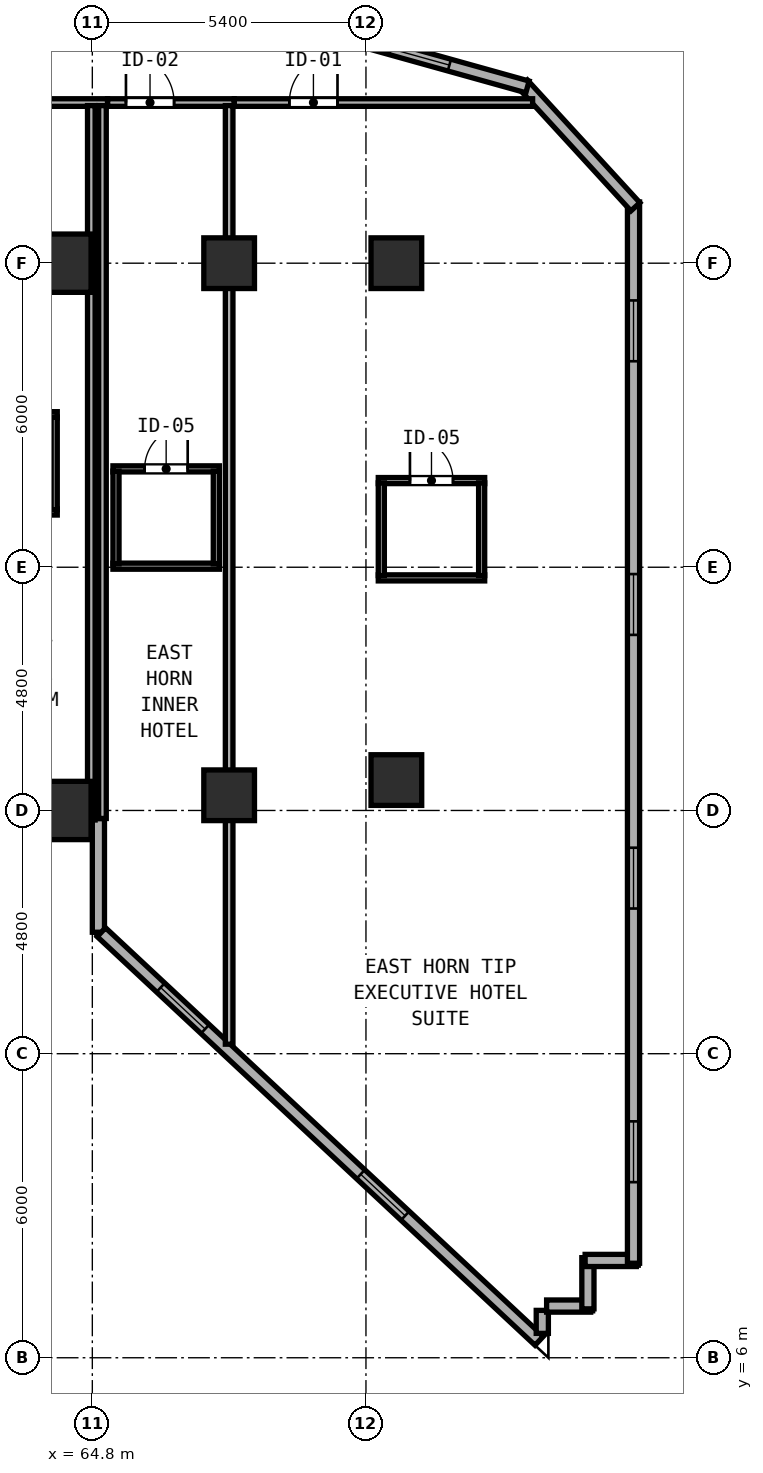
"""IFC4 building model, lengths in metres.
Left out: names, types, materials, properties, quantities, classifications, styles, units other than length and angle.
Written with IfcOpenShell. Run it as: python <this file> out.ifc"""

import sys

from ifc_helpers import new_model, si_unit, direction, frame, frame_2d, origin, origin_2d, place, context, subcontext, project, spatial, rectangle, hollow_rectangle, extrude, element, fill, save


model = new_model("IFC4")
c1 = context("Model", 3, precision=1e-05, world=origin(), true_north=direction((0.0, 1.0)))
c2 = subcontext(c1, "Body", "Model", "MODEL_VIEW")
j1 = project(units=[si_unit("LENGTHUNIT", "METRE"), si_unit("PLANEANGLEUNIT", "RADIAN")], contexts=[c1])
p1 = place(None, origin())
s1 = spatial("IfcSite", under=j1, at=p1, CompositionType="ELEMENT")
p2 = place(p1, origin())
s2 = spatial("IfcBuilding", under=s1, at=p2, CompositionType="ELEMENT")
p3 = place(p2, frame((0.0, 0.0, 78.0)))
s3 = spatial("IfcBuildingStorey", under=s2, at=p3, CompositionType="ELEMENT", Elevation=78.0)
for number, where, z_axis, x_axis in (
    (1, (64.2, 16.8, 0.0), (0.0, 0.0, 1.0), (1.0, 0.0, 0.0)),
    (2, (64.2, 27.6, 0.0), (0.0, 0.0, 1.0), (1.0, 0.0, 0.0)),
):
    element("IfcColumn", number, at=place(p3, frame(where, z_axis=z_axis, x_axis=x_axis)), inside=s3, PredefinedType="COLUMN", context=c2, shape_type="SweptSolid", body=[
        extrude(hollow_rectangle(XDim=1.15, YDim=1.15, WallThickness=0.042, at=origin_2d()), origin(), (0.0, 0.0, 1.0), 3.8),
    ])
for number, where, z_axis, x_axis in (
    (3, (70.8, 17.4, 0.0), (0.0, 0.0, 1.0), (1.0, 0.0, 0.0)),
    (4, (70.8, 27.6, 0.0), (0.0, 0.0, 1.0), (1.0, 0.0, 0.0)),
    (5, (67.5, 17.1, 0.0), (0.0, 0.0, 1.0), (1.0, 0.0, 0.0)),
    (6, (67.5, 27.6, 0.0), (0.0, 0.0, 1.0), (1.0, 0.0, 0.0)),
):
    element("IfcColumn", number, at=place(p3, frame(where, z_axis=z_axis, x_axis=x_axis)), inside=s3, PredefinedType="COLUMN", context=c2, shape_type="SweptSolid", body=[
        extrude(hollow_rectangle(XDim=1.0, YDim=1.0, WallThickness=0.038, at=origin_2d()), origin(), (0.0, 0.0, 1.0), 3.8),
    ])
p4 = place(p3, frame((64.92, 16.64, 0.0), z_axis=(0.0, 0.0, 1.0), x_axis=(0.0, -1.0, 0.0)))
e7 = element("IfcWall", 7, at=p4, inside=s3, PredefinedType="SOLIDWALL", context=c2, shape_type="SweptSolid", body=[
    extrude(rectangle(XDim=2.243, YDim=0.24, at=frame_2d((1.121, 0.0))), origin(), (0.0, 0.0, 1.0), 3.6),
])
p5 = place(p3, frame((64.979, 14.397, 0.0), z_axis=(0.0, 0.0, 1.0), x_axis=(0.731053894258, -0.682319722484, 0.0)))
e8 = element("IfcWall", 8, at=p5, inside=s3, PredefinedType="SOLIDWALL", context=c2, shape_type="SweptSolid", body=[
    extrude(rectangle(XDim=11.818, YDim=0.24, at=frame_2d((5.909, 0.0))), origin(), (0.0, 0.0, 1.0), 3.6),
])
p6 = place(p5, frame((1.6, 0.0, 0.85)))
e9 = element("IfcOpeningElement", 9, at=p6, cuts=e8, PredefinedType="OPENING", context=c2, shape_type="SweptSolid", body=[
    extrude(rectangle(XDim=1.2, YDim=1.85, at=frame_2d((0.6, 0.925))), frame((0.0, 0.13, 0.0), z_axis=(0.0, -1.0, 0.0), x_axis=(1.0, 0.0, 0.0)), (0.0, 0.0, 1.0), 0.26),
])
p7 = place(p5, frame((7.0, 0.0, 0.85)))
e10 = element("IfcOpeningElement", 10, at=p7, cuts=e8, PredefinedType="OPENING", context=c2, shape_type="SweptSolid", body=[
    extrude(rectangle(XDim=1.2, YDim=1.85, at=frame_2d((0.6, 0.925))), frame((0.0, 0.13, 0.0), z_axis=(0.0, -1.0, 0.0), x_axis=(1.0, 0.0, 0.0)), (0.0, 0.0, 1.0), 0.26),
])
p8 = place(p3, frame((73.68, 6.481, 0.0), z_axis=(0.0, 0.0, 1.0), x_axis=(0.0, 1.0, 0.0)))
e11 = element("IfcWall", 11, at=p8, inside=s3, PredefinedType="SOLIDWALL", context=c2, shape_type="SweptSolid", body=[
    extrude(rectangle(XDim=0.454, YDim=0.24, at=frame_2d((0.227, 0.0))), origin(), (0.0, 0.0, 1.0), 3.6),
])
p9 = place(p3, frame((73.765, 7.02, 0.0), z_axis=(0.0, 0.0, 1.0), x_axis=(1.0, 0.0, 0.0)))
e12 = element("IfcWall", 12, at=p9, inside=s3, PredefinedType="SOLIDWALL", context=c2, shape_type="SweptSolid", body=[
    extrude(rectangle(XDim=0.87, YDim=0.24, at=frame_2d((0.435, 0.0))), origin(), (0.0, 0.0, 1.0), 3.6),
])
for number, where, z_axis, x_axis in (
    (13, (74.58, 6.965, 0.0), (0.0, 0.0, 1.0), (0.0, 1.0, 0.0)),
    (14, (74.525, 7.92, 0.0), (0.0, 0.0, 1.0), (1.0, 0.0, 0.0)),
):
    element("IfcWall", number, at=place(p3, frame(where, z_axis=z_axis, x_axis=x_axis)), inside=s3, PredefinedType="SOLIDWALL", context=c2, shape_type="SweptSolid", body=[
        extrude(rectangle(XDim=1.01, YDim=0.24, at=frame_2d((0.505, 0.0))), origin(), (0.0, 0.0, 1.0), 3.6),
    ])
p10 = place(p3, frame((75.48, 7.865, 0.0), z_axis=(0.0, 0.0, 1.0), x_axis=(0.0, 1.0, 0.0)))
e15 = element("IfcWall", 15, at=p10, inside=s3, PredefinedType="SOLIDWALL", context=c2, shape_type="SweptSolid", body=[
    extrude(rectangle(XDim=20.943, YDim=0.24, at=frame_2d((10.472, 0.0))), origin(), (0.0, 0.0, 1.0), 3.6),
])
p11 = place(p10, frame((1.6, 0.0, 0.85)))
e16 = element("IfcOpeningElement", 16, at=p11, cuts=e15, PredefinedType="OPENING", context=c2, shape_type="SweptSolid", body=[
    extrude(rectangle(XDim=1.2, YDim=1.85, at=frame_2d((0.6, 0.925))), frame((0.0, 0.13, 0.0), z_axis=(0.0, -1.0, 0.0), x_axis=(1.0, 0.0, 0.0)), (0.0, 0.0, 1.0), 0.26),
])
p12 = place(p10, frame((7.0, 0.0, 0.85)))
e17 = element("IfcOpeningElement", 17, at=p12, cuts=e15, PredefinedType="OPENING", context=c2, shape_type="SweptSolid", body=[
    extrude(rectangle(XDim=1.2, YDim=1.85, at=frame_2d((0.6, 0.925))), frame((0.0, 0.13, 0.0), z_axis=(0.0, -1.0, 0.0), x_axis=(1.0, 0.0, 0.0)), (0.0, 0.0, 1.0), 0.26),
])
p13 = place(p10, frame((12.4, 0.0, 0.85)))
e18 = element("IfcOpeningElement", 18, at=p13, cuts=e15, PredefinedType="OPENING", context=c2, shape_type="SweptSolid", body=[
    extrude(rectangle(XDim=1.2, YDim=1.85, at=frame_2d((0.6, 0.925))), frame((0.0, 0.13, 0.0), z_axis=(0.0, -1.0, 0.0), x_axis=(1.0, 0.0, 0.0)), (0.0, 0.0, 1.0), 0.26),
])
p14 = place(p10, frame((17.8, 0.0, 0.85)))
e19 = element("IfcOpeningElement", 19, at=p14, cuts=e15, PredefinedType="OPENING", context=c2, shape_type="SweptSolid", body=[
    extrude(rectangle(XDim=1.2, YDim=1.85, at=frame_2d((0.6, 0.925))), frame((0.0, 0.13, 0.0), z_axis=(0.0, -1.0, 0.0), x_axis=(1.0, 0.0, 0.0)), (0.0, 0.0, 1.0), 0.26),
])
p15 = place(p3, frame((75.517, 28.713, 0.0), z_axis=(0.0, 0.0, 1.0), x_axis=(-0.67574145796, 0.737138712858, 0.0)))
e20 = element("IfcWall", 20, at=p15, inside=s3, PredefinedType="SOLIDWALL", context=c2, shape_type="SweptSolid", body=[
    extrude(rectangle(XDim=3.284, YDim=0.24, at=frame_2d((1.642, 0.0))), origin(), (0.0, 0.0, 1.0), 3.6),
])
p16 = place(p3, frame((73.388, 31.079, 0.0), z_axis=(0.0, 0.0, 1.0), x_axis=(-0.963197271032, 0.268795493036, 0.0)))
e21 = element("IfcWall", 21, at=p16, inside=s3, PredefinedType="SOLIDWALL", context=c2, shape_type="SweptSolid", body=[
    extrude(rectangle(XDim=9.095, YDim=0.24, at=frame_2d((4.548, 0.0))), origin(), (0.0, 0.0, 1.0), 3.6),
])
p17 = place(p16, frame((1.6, 0.0, 0.85)))
e22 = element("IfcOpeningElement", 22, at=p17, cuts=e21, PredefinedType="OPENING", context=c2, shape_type="SweptSolid", body=[
    extrude(rectangle(XDim=1.2, YDim=1.85, at=frame_2d((0.6, 0.925))), frame((0.0, 0.13, 0.0), z_axis=(0.0, -1.0, 0.0), x_axis=(1.0, 0.0, 0.0)), (0.0, 0.0, 1.0), 0.26),
])
p18 = place(p16, frame((7.0, 0.0, 0.85)))
e23 = element("IfcOpeningElement", 23, at=p18, cuts=e21, PredefinedType="OPENING", context=c2, shape_type="SweptSolid", body=[
    extrude(rectangle(XDim=1.2, YDim=1.85, at=frame_2d((0.6, 0.925))), frame((0.0, 0.13, 0.0), z_axis=(0.0, -1.0, 0.0), x_axis=(1.0, 0.0, 0.0)), (0.0, 0.0, 1.0), 0.26),
])
p19 = place(p3, frame((61.202, 30.77, 0.0), z_axis=(0.0, 0.0, 1.0), x_axis=(1.0, 0.0, 0.0)))
e24 = element("IfcWall", 24, at=p19, inside=s3, PredefinedType="PARTITIONING", context=c2, shape_type="SweptSolid", body=[
    extrude(rectangle(XDim=3.898, YDim=0.15, at=frame_2d((1.949, 0.0))), origin(), (0.0, 0.0, 1.0), 3.6),
])
p20 = place(p19, frame((1.09, 0.0, 0.0), z_axis=(0.0, 0.0, 1.0), x_axis=(-1.0, 0.0, 0.0)))
e25 = element("IfcOpeningElement", 25, at=p20, cuts=e24, PredefinedType="OPENING", context=c2, shape_type="SweptSolid", body=[
    extrude(rectangle(XDim=0.95, YDim=2.15, at=frame_2d((0.475, 1.075))), frame((0.0, 0.085, 0.0), z_axis=(0.0, -1.0, 0.0), x_axis=(1.0, 0.0, 0.0)), (0.0, 0.0, 1.0), 0.17),
])
p21 = place(p3, frame((65.0, 16.642, 0.0), z_axis=(0.0, 0.0, 1.0), x_axis=(0.0, 1.0, 0.0)))
e26 = element("IfcWall", 26, at=p21, inside=s3, PredefinedType="PARTITIONING", context=c2, shape_type="SweptSolid", body=[
    extrude(rectangle(XDim=14.068, YDim=0.15, at=frame_2d((7.034, 0.0))), origin(), (0.0, 0.0, 1.0), 3.6),
])
p22 = place(p3, frame((62.008, 24.61, 0.0), z_axis=(0.0, 0.0, 1.0), x_axis=(1.0, 0.0, 0.0)))
e27 = element("IfcWall", 27, at=p22, inside=s3, PredefinedType="PARTITIONING", context=c2, shape_type="SweptSolid", body=[
    extrude(rectangle(XDim=2.1, YDim=0.12, at=frame_2d((1.05, 0.0))), origin(), (0.0, 0.0, 1.0), 3.6),
])
p23 = place(p22, frame((1.475, 0.0, 0.0), z_axis=(0.0, 0.0, 1.0), x_axis=(-1.0, 0.0, 0.0)))
e28 = element("IfcOpeningElement", 28, at=p23, cuts=e27, PredefinedType="OPENING", context=c2, shape_type="SweptSolid", body=[
    extrude(rectangle(XDim=0.85, YDim=2.1, at=frame_2d((0.425, 1.05))), frame((0.0, 0.07, 0.0), z_axis=(0.0, -1.0, 0.0), x_axis=(1.0, 0.0, 0.0)), (0.0, 0.0, 1.0), 0.14),
])
p24 = place(p3, frame((62.008, 22.69, 0.0), z_axis=(0.0, 0.0, 1.0), x_axis=(1.0, 0.0, 0.0)))
e29 = element("IfcWall", 29, at=p24, inside=s3, PredefinedType="PARTITIONING", context=c2, shape_type="SweptSolid", body=[
    extrude(rectangle(XDim=2.1, YDim=0.12, at=frame_2d((1.05, 0.0))), origin(), (0.0, 0.0, 1.0), 3.6),
])
p25 = place(p3, frame((64.048, 22.735, 0.0), z_axis=(0.0, 0.0, 1.0), x_axis=(0.0, 1.0, 0.0)))
e30 = element("IfcWall", 30, at=p25, inside=s3, PredefinedType="PARTITIONING", context=c2, shape_type="SweptSolid", body=[
    extrude(rectangle(XDim=1.83, YDim=0.12, at=frame_2d((0.915, 0.0))), origin(), (0.0, 0.0, 1.0), 3.097),
])
p26 = place(p3, frame((65.102, 30.77, 0.0), z_axis=(0.0, 0.0, 1.0), x_axis=(1.0, 0.0, 0.0)))
e31 = element("IfcWall", 31, at=p26, inside=s3, PredefinedType="PARTITIONING", context=c2, shape_type="SweptSolid", body=[
    extrude(rectangle(XDim=2.498, YDim=0.15, at=frame_2d((1.249, 0.0))), origin(), (0.0, 0.0, 1.0), 3.6),
])
p27 = place(p26, frame((1.312, 0.0, 0.0), z_axis=(0.0, 0.0, 1.0), x_axis=(-1.0, 0.0, 0.0)))
e32 = element("IfcOpeningElement", 32, at=p27, cuts=e31, PredefinedType="OPENING", context=c2, shape_type="SweptSolid", body=[
    extrude(rectangle(XDim=0.95, YDim=2.15, at=frame_2d((0.475, 1.075))), frame((0.0, 0.085, 0.0), z_axis=(0.0, -1.0, 0.0), x_axis=(1.0, 0.0, 0.0)), (0.0, 0.0, 1.0), 0.17),
])
p28 = place(p3, frame((67.5, 12.188, 0.0), z_axis=(0.0, 0.0, 1.0), x_axis=(0.0, 1.0, 0.0)))
e33 = element("IfcWall", 33, at=p28, inside=s3, PredefinedType="PARTITIONING", context=c2, shape_type="SweptSolid", body=[
    extrude(rectangle(XDim=18.522, YDim=0.15, at=frame_2d((9.261, 0.0))), origin(), (0.0, 0.0, 1.0), 3.6),
])
p29 = place(p3, frame((64.78, 16.612, 0.0), z_axis=(0.0, 0.0, 1.0), x_axis=(0.0, 1.0, 0.0)))
e34 = element("IfcWall", 34, at=p29, inside=s3, PredefinedType="PARTITIONING", context=c2, shape_type="SweptSolid", body=[
    extrude(rectangle(XDim=14.098, YDim=0.15, at=frame_2d((7.049, 0.0))), origin(), (0.0, 0.0, 1.0), 3.6),
])
p30 = place(p3, frame((65.207, 23.541, 0.0), z_axis=(0.0, 0.0, 1.0), x_axis=(1.0, 0.0, 0.0)))
e35 = element("IfcWall", 35, at=p30, inside=s3, PredefinedType="PARTITIONING", context=c2, shape_type="SweptSolid", body=[
    extrude(rectangle(XDim=2.1, YDim=0.12, at=frame_2d((1.05, 0.0))), origin(), (0.0, 0.0, 1.0), 3.6),
])
p31 = place(p30, frame((1.475, 0.0, 0.0), z_axis=(0.0, 0.0, 1.0), x_axis=(-1.0, 0.0, 0.0)))
e36 = element("IfcOpeningElement", 36, at=p31, cuts=e35, PredefinedType="OPENING", context=c2, shape_type="SweptSolid", body=[
    extrude(rectangle(XDim=0.85, YDim=2.1, at=frame_2d((0.425, 1.05))), frame((0.0, 0.07, 0.0), z_axis=(0.0, -1.0, 0.0), x_axis=(1.0, 0.0, 0.0)), (0.0, 0.0, 1.0), 0.14),
])
p32 = place(p3, frame((65.207, 21.621, 0.0), z_axis=(0.0, 0.0, 1.0), x_axis=(1.0, 0.0, 0.0)))
e37 = element("IfcWall", 37, at=p32, inside=s3, PredefinedType="PARTITIONING", context=c2, shape_type="SweptSolid", body=[
    extrude(rectangle(XDim=2.1, YDim=0.12, at=frame_2d((1.05, 0.0))), origin(), (0.0, 0.0, 1.0), 3.6),
])
for number, where, z_axis, x_axis in (
    (38, (65.267, 21.666, 0.0), (0.0, 0.0, 1.0), (0.0, 1.0, 0.0)),
    (39, (67.247, 21.666, 0.0), (0.0, 0.0, 1.0), (0.0, 1.0, 0.0)),
):
    element("IfcWall", number, at=place(p3, frame(where, z_axis=z_axis, x_axis=x_axis)), inside=s3, PredefinedType="PARTITIONING", context=c2, shape_type="SweptSolid", body=[
        extrude(rectangle(XDim=1.83, YDim=0.12, at=frame_2d((0.915, 0.0))), origin(), (0.0, 0.0, 1.0), 3.6),
    ])
p33 = place(p3, frame((67.602, 30.77, 0.0), z_axis=(0.0, 0.0, 1.0), x_axis=(1.0, 0.0, 0.0)))
e40 = element("IfcWall", 40, at=p33, inside=s3, PredefinedType="PARTITIONING", context=c2, shape_type="SweptSolid", body=[
    extrude(rectangle(XDim=5.887, YDim=0.15, at=frame_2d((2.943, 0.0))), origin(), (0.0, 0.0, 1.0), 3.6),
])
p34 = place(p33, frame((2.036, 0.0, 0.0), z_axis=(0.0, 0.0, 1.0), x_axis=(-1.0, 0.0, 0.0)))
e41 = element("IfcOpeningElement", 41, at=p34, cuts=e40, PredefinedType="OPENING", context=c2, shape_type="SweptSolid", body=[
    extrude(rectangle(XDim=0.95, YDim=2.18, at=frame_2d((0.475, 1.09))), frame((0.0, 0.085, 0.0), z_axis=(0.0, -1.0, 0.0), x_axis=(1.0, 0.0, 0.0)), (0.0, 0.0, 1.0), 0.17),
])
p35 = place(p3, frame((70.443, 23.31, 0.0), z_axis=(0.0, 0.0, 1.0), x_axis=(1.0, 0.0, 0.0)))
e42 = element("IfcWall", 42, at=p35, inside=s3, PredefinedType="PARTITIONING", context=c2, shape_type="SweptSolid", body=[
    extrude(rectangle(XDim=2.1, YDim=0.12, at=frame_2d((1.05, 0.0))), origin(), (0.0, 0.0, 1.0), 3.6),
])
p36 = place(p35, frame((1.475, 0.0, 0.0), z_axis=(0.0, 0.0, 1.0), x_axis=(-1.0, 0.0, 0.0)))
e43 = element("IfcOpeningElement", 43, at=p36, cuts=e42, PredefinedType="OPENING", context=c2, shape_type="SweptSolid", body=[
    extrude(rectangle(XDim=0.85, YDim=2.1, at=frame_2d((0.425, 1.05))), frame((0.0, 0.07, 0.0), z_axis=(0.0, -1.0, 0.0), x_axis=(1.0, 0.0, 0.0)), (0.0, 0.0, 1.0), 0.14),
])
p37 = place(p3, frame((70.443, 21.39, 0.0), z_axis=(0.0, 0.0, 1.0), x_axis=(1.0, 0.0, 0.0)))
e44 = element("IfcWall", 44, at=p37, inside=s3, PredefinedType="PARTITIONING", context=c2, shape_type="SweptSolid", body=[
    extrude(rectangle(XDim=2.1, YDim=0.12, at=frame_2d((1.05, 0.0))), origin(), (0.0, 0.0, 1.0), 3.6),
])
for number, where, z_axis, x_axis in (
    (45, (70.503, 21.435, 0.0), (0.0, 0.0, 1.0), (0.0, 1.0, 0.0)),
    (46, (72.483, 21.435, 0.0), (0.0, 0.0, 1.0), (0.0, 1.0, 0.0)),
):
    element("IfcWall", number, at=place(p3, frame(where, z_axis=z_axis, x_axis=x_axis)), inside=s3, PredefinedType="PARTITIONING", context=c2, shape_type="SweptSolid", body=[
        extrude(rectangle(XDim=1.83, YDim=0.12, at=frame_2d((0.915, 0.0))), origin(), (0.0, 0.0, 1.0), 3.6),
    ])
p38 = place(p6, origin())
e47 = element("IfcWindow", 47, at=p38, inside=s3, PartitioningType="SINGLE_PANEL", PredefinedType="WINDOW", context=c2, shape_type="SweptSolid", body=[
    extrude(rectangle(XDim=1.2, YDim=1.85, at=frame_2d((0.6, 0.925))), frame((0.0, 0.03, 0.0), z_axis=(0.0, -1.0, 0.0), x_axis=(1.0, 0.0, 0.0)), (0.0, 0.0, 1.0), 0.06),
])
fill(e9, e47)
p39 = place(p7, origin())
e48 = element("IfcWindow", 48, at=p39, inside=s3, PartitioningType="SINGLE_PANEL", PredefinedType="WINDOW", context=c2, shape_type="SweptSolid", body=[
    extrude(rectangle(XDim=1.2, YDim=1.85, at=frame_2d((0.6, 0.925))), frame((0.0, 0.03, 0.0), z_axis=(0.0, -1.0, 0.0), x_axis=(1.0, 0.0, 0.0)), (0.0, 0.0, 1.0), 0.06),
])
fill(e10, e48)
p40 = place(p11, origin())
e49 = element("IfcWindow", 49, at=p40, inside=s3, PartitioningType="SINGLE_PANEL", PredefinedType="WINDOW", context=c2, shape_type="SweptSolid", body=[
    extrude(rectangle(XDim=1.2, YDim=1.85, at=frame_2d((0.6, 0.925))), frame((0.0, 0.03, 0.0), z_axis=(0.0, -1.0, 0.0), x_axis=(1.0, 0.0, 0.0)), (0.0, 0.0, 1.0), 0.06),
])
fill(e16, e49)
p41 = place(p12, origin())
e50 = element("IfcWindow", 50, at=p41, inside=s3, PartitioningType="SINGLE_PANEL", PredefinedType="WINDOW", context=c2, shape_type="SweptSolid", body=[
    extrude(rectangle(XDim=1.2, YDim=1.85, at=frame_2d((0.6, 0.925))), frame((0.0, 0.03, 0.0), z_axis=(0.0, -1.0, 0.0), x_axis=(1.0, 0.0, 0.0)), (0.0, 0.0, 1.0), 0.06),
])
fill(e17, e50)
p42 = place(p13, origin())
e51 = element("IfcWindow", 51, at=p42, inside=s3, PartitioningType="SINGLE_PANEL", PredefinedType="WINDOW", context=c2, shape_type="SweptSolid", body=[
    extrude(rectangle(XDim=1.2, YDim=1.85, at=frame_2d((0.6, 0.925))), frame((0.0, 0.03, 0.0), z_axis=(0.0, -1.0, 0.0), x_axis=(1.0, 0.0, 0.0)), (0.0, 0.0, 1.0), 0.06),
])
fill(e18, e51)
p43 = place(p14, origin())
e52 = element("IfcWindow", 52, at=p43, inside=s3, PartitioningType="SINGLE_PANEL", PredefinedType="WINDOW", context=c2, shape_type="SweptSolid", body=[
    extrude(rectangle(XDim=1.2, YDim=1.85, at=frame_2d((0.6, 0.925))), frame((0.0, 0.03, 0.0), z_axis=(0.0, -1.0, 0.0), x_axis=(1.0, 0.0, 0.0)), (0.0, 0.0, 1.0), 0.06),
])
fill(e19, e52)
p44 = place(p17, origin())
e53 = element("IfcWindow", 53, at=p44, inside=s3, PartitioningType="SINGLE_PANEL", PredefinedType="WINDOW", context=c2, shape_type="SweptSolid", body=[
    extrude(rectangle(XDim=1.2, YDim=1.85, at=frame_2d((0.6, 0.925))), frame((0.0, 0.03, 0.0), z_axis=(0.0, -1.0, 0.0), x_axis=(1.0, 0.0, 0.0)), (0.0, 0.0, 1.0), 0.06),
])
fill(e22, e53)
p45 = place(p27, origin())
e54 = element("IfcDoor", 54, at=p45, inside=s3, OperationType="SINGLE_SWING_RIGHT", PredefinedType="DOOR", context=c2, shape_type="SweptSolid", body=[
    extrude(rectangle(XDim=0.95, YDim=2.15, at=frame_2d((0.475, 1.075))), frame((0.0, 0.025, 0.0), z_axis=(0.0, -1.0, 0.0), x_axis=(1.0, 0.0, 0.0)), (0.0, 0.0, 1.0), 0.05),
])
fill(e32, e54)
p46 = place(p31, origin())
e55 = element("IfcDoor", 55, at=p46, inside=s3, OperationType="SINGLE_SWING_LEFT", PredefinedType="DOOR", context=c2, shape_type="SweptSolid", body=[
    extrude(rectangle(XDim=0.85, YDim=2.1, at=frame_2d((0.425, 1.05))), frame((0.0, 0.025, 0.0), z_axis=(0.0, -1.0, 0.0), x_axis=(1.0, 0.0, 0.0)), (0.0, 0.0, 1.0), 0.05),
])
fill(e36, e55)
p47 = place(p34, origin())
e56 = element("IfcDoor", 56, at=p47, inside=s3, OperationType="SINGLE_SWING_LEFT", PredefinedType="DOOR", context=c2, shape_type="SweptSolid", body=[
    extrude(rectangle(XDim=0.95, YDim=2.18, at=frame_2d((0.475, 1.09))), frame((0.0, 0.025, 0.0), z_axis=(0.0, -1.0, 0.0), x_axis=(1.0, 0.0, 0.0)), (0.0, 0.0, 1.0), 0.05),
])
fill(e41, e56)
p48 = place(p36, origin())
e57 = element("IfcDoor", 57, at=p48, inside=s3, OperationType="SINGLE_SWING_RIGHT", PredefinedType="DOOR", context=c2, shape_type="SweptSolid", body=[
    extrude(rectangle(XDim=0.85, YDim=2.1, at=frame_2d((0.425, 1.05))), frame((0.0, 0.025, 0.0), z_axis=(0.0, -1.0, 0.0), x_axis=(1.0, 0.0, 0.0)), (0.0, 0.0, 1.0), 0.05),
])
fill(e43, e57)
save(model, sys.argv[1])
